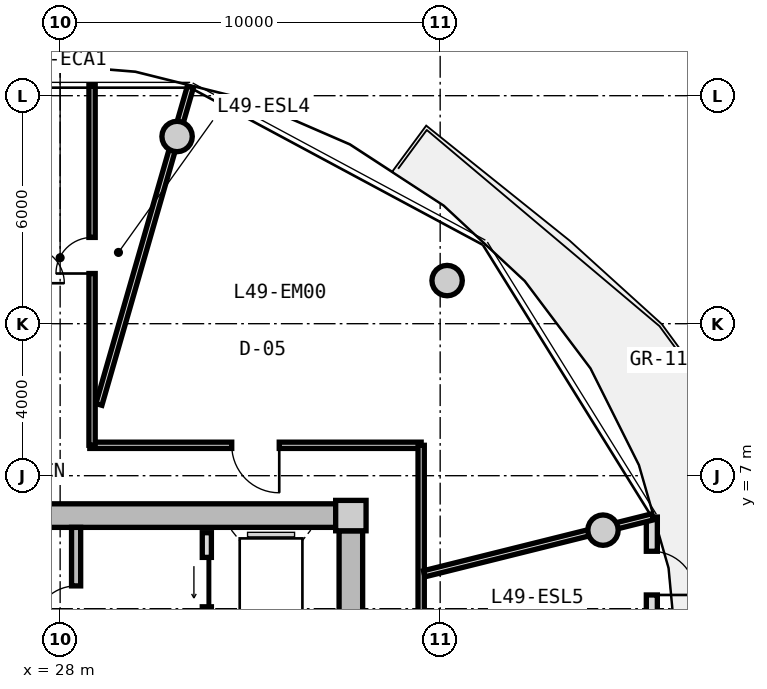
"""IFC4 building model, lengths in metres.
Left out: names, types, materials, properties, quantities, classifications, styles, units other than length and angle.
Written with IfcOpenShell. Run it as: python <this file> out.ifc"""

import sys

from ifc_helpers import new_model, si_unit, direction, frame, frame_2d, origin, origin_2d, place, context, subcontext, project, spatial, rectangle, circle, extrude, source, transform, mapped, element, fill, save


model = new_model("IFC4")
c1 = context("Model", 3, precision=1e-05, world=origin(), true_north=direction((0.0, 1.0)))
c2 = subcontext(c1, "Body", "Model", "MODEL_VIEW")
j1 = project(units=[si_unit("LENGTHUNIT", "METRE"), si_unit("PLANEANGLEUNIT", "RADIAN")], contexts=[c1])
p1 = place(None, origin())
s1 = spatial("IfcSite", under=j1, at=p1, CompositionType="ELEMENT")
p2 = place(p1, origin())
s2 = spatial("IfcBuilding", under=s1, at=p2, CompositionType="ELEMENT")
p3 = place(p2, frame((0.0, 0.0, 158.7)))
s3 = spatial("IfcBuildingStorey", under=s2, at=p3, CompositionType="ELEMENT", Elevation=158.7)
m1 = source(origin(), c2, "Body", "SweptSolid", [
    extrude(rectangle(XDim=0.8, YDim=0.8, at=origin_2d()), origin(), (0.0, 0.0, 1.0), 3.05),
])
p4 = place(p3, frame((35.65, 5.95, 0.0), z_axis=(0.0, 0.0, 1.0), x_axis=(1.0, 0.0, 0.0)))
e1 = element("IfcColumn", 1, at=p4, inside=s3, PredefinedType="COLUMN", context=c2, shape_type="MappedRepresentation", body=[
    mapped(m1, transform((0.0, 0.0, 0.0), x_axis=(1.0, 0.0, 0.0), y_axis=(0.0, 1.0, 0.0), z_axis=(0.0, 0.0, 1.0), scale=1.0)),
])
m2 = source(origin(), c2, "Body", "SweptSolid", [
    extrude(rectangle(XDim=14.5, YDim=0.62, at=frame_2d((7.25, 0.0))), origin(), (0.0, 0.0, 1.0), 2.81),
])
p5 = place(p3, frame((20.75, 5.95, 0.0), z_axis=(0.0, 0.0, 1.0), x_axis=(1.0, 0.0, 0.0)))
e2 = element("IfcWall", 2, at=p5, inside=s3, PredefinedType="SHEAR", context=c2, shape_type="MappedRepresentation", body=[
    mapped(m2, transform((0.0, 0.0, 0.0), x_axis=(1.0, 0.0, 0.0), y_axis=(0.0, 1.0, 0.0), z_axis=(0.0, 0.0, 1.0), scale=1.0)),
])
m3 = source(origin(), c2, "Body", "SweptSolid", [
    extrude(rectangle(XDim=11.1, YDim=0.62, at=frame_2d((5.55, 0.0))), origin(), (0.0, 0.0, 1.0), 2.81),
])
p6 = place(p3, frame((35.65, 5.55, 0.0), z_axis=(0.0, 0.0, 1.0), x_axis=(0.0, -1.0, 0.0)))
e3 = element("IfcWall", 3, at=p6, inside=s3, PredefinedType="SHEAR", context=c2, shape_type="MappedRepresentation", body=[
    mapped(m3, transform((0.0, 0.0, 0.0), x_axis=(1.0, 0.0, 0.0), y_axis=(0.0, 1.0, 0.0), z_axis=(0.0, 0.0, 1.0), scale=1.0)),
])
p7 = place(p6, frame((5.65, 0.0, 0.0)))
e4 = element("IfcOpeningElement", 4, at=p7, cuts=e3, PredefinedType="OPENING", context=c2, shape_type="SweptSolid", body=[
    extrude(rectangle(XDim=1.2, YDim=2.15, at=frame_2d((0.6, 1.075))), frame((0.0, 0.32, 0.0), z_axis=(0.0, -1.0, 0.0), x_axis=(1.0, 0.0, 0.0)), (0.0, 0.0, 1.0), 0.64),
])
m4 = source(origin(), c2, "Body", "SweptSolid", [
    extrude(circle(Radius=0.4, at=origin_2d()), origin(), (0.0, 0.0, 1.0), 3.05),
])
for number, where, z_axis, x_axis in (
    (5, (42.285, 5.567, 0.0), (0.0, 0.0, 1.0), (1.0, 0.0, 0.0)),
    (6, (38.183, 12.135, 0.0), (0.0, 0.0, 1.0), (1.0, 0.0, 0.0)),
    (7, (31.077, 15.926, 0.0), (0.0, 0.0, 1.0), (1.0, 0.0, 0.0)),
):
    element("IfcColumn", number, at=place(p3, frame(where, z_axis=z_axis, x_axis=x_axis)), inside=s3, PredefinedType="COLUMN", context=c2, shape_type="MappedRepresentation", body=[
        mapped(m4, transform((0.0, 0.0, 0.0), x_axis=(1.0, 0.0, 0.0), y_axis=(0.0, 1.0, 0.0), z_axis=(0.0, 0.0, 1.0), scale=1.0)),
    ])
m5 = source(origin(), c2, "Body", "SweptSolid", [
    extrude(rectangle(XDim=8.272, YDim=0.29, at=frame_2d((4.136, 0.0))), origin(), (0.0, 0.0, 1.0), 2.81),
])
p8 = place(p3, frame((43.57, 5.911, 0.0), z_axis=(0.0, 0.0, 1.0), x_axis=(0.0, -1.0, 0.0)))
e8 = element("IfcWall", 8, at=p8, inside=s3, PredefinedType="SOLIDWALL", context=c2, shape_type="MappedRepresentation", body=[
    mapped(m5, transform((0.0, 0.0, 0.0), x_axis=(1.0, 0.0, 0.0), y_axis=(0.0, 1.0, 0.0), z_axis=(0.0, 0.0, 1.0), scale=1.0)),
])
p9 = place(p8, frame((0.9, 0.0, 0.0)))
e9 = element("IfcOpeningElement", 9, at=p9, cuts=e8, PredefinedType="OPENING", context=c2, shape_type="SweptSolid", body=[
    extrude(rectangle(XDim=1.15, YDim=2.25, at=frame_2d((0.575, 1.125))), frame((0.0, 0.155, 0.0), z_axis=(0.0, -1.0, 0.0), x_axis=(1.0, 0.0, 0.0)), (0.0, 0.0, 1.0), 0.31),
])
p10 = place(p8, frame((2.65, 0.0, 0.85)))
e10 = element("IfcOpeningElement", 10, at=p10, cuts=e8, PredefinedType="OPENING", context=c2, shape_type="SweptSolid", body=[
    extrude(rectangle(XDim=1.2, YDim=1.5, at=frame_2d((0.6, 0.75))), frame((0.0, 0.155, 0.0), z_axis=(0.0, -1.0, 0.0), x_axis=(1.0, 0.0, 0.0)), (0.0, 0.0, 1.0), 0.31),
])
m6 = source(origin(), c2, "Body", "SweptSolid", [
    extrude(rectangle(XDim=3.19, YDim=0.24, at=frame_2d((1.595, 0.0))), origin(), (0.0, 0.0, 1.0), 2.81),
])
p11 = place(p3, frame((28.42, 2.45, 0.0), z_axis=(0.0, 0.0, 1.0), x_axis=(0.0, 1.0, 0.0)))
e11 = element("IfcWall", 11, at=p11, inside=s3, PredefinedType="PARTITIONING", context=c2, shape_type="MappedRepresentation", body=[
    mapped(m6, transform((0.0, 0.0, 0.0), x_axis=(1.0, 0.0, 0.0), y_axis=(0.0, 1.0, 0.0), z_axis=(0.0, 0.0, 1.0), scale=1.0)),
])
p12 = place(p11, frame((0.55, 0.0, 0.0)))
e12 = element("IfcOpeningElement", 12, at=p12, cuts=e11, PredefinedType="OPENING", context=c2, shape_type="SweptSolid", body=[
    extrude(rectangle(XDim=1.1, YDim=2.15, at=frame_2d((0.55, 1.075))), frame((0.0, 0.13, 0.0), z_axis=(0.0, -1.0, 0.0), x_axis=(1.0, 0.0, 0.0)), (0.0, 0.0, 1.0), 0.26),
])
m7 = source(origin(), c2, "Body", "SweptSolid", [
    extrude(rectangle(XDim=5.0, YDim=0.24, at=frame_2d((2.5, 0.0))), origin(), (0.0, 0.0, 1.0), 2.795),
])
p13 = place(p3, frame((31.86, 0.5, 0.0), z_axis=(0.0, 0.0, 1.0), x_axis=(0.0, 1.0, 0.0)))
e13 = element("IfcWall", 13, at=p13, inside=s3, PredefinedType="PARTITIONING", context=c2, shape_type="MappedRepresentation", body=[
    mapped(m7, transform((0.0, 0.0, 0.0), x_axis=(1.0, 0.0, 0.0), y_axis=(0.0, 1.0, 0.0), z_axis=(0.0, 0.0, 1.0), scale=1.0)),
])
p14 = place(p13, frame((3.05, 0.0, 0.0)))
e14 = element("IfcOpeningElement", 14, at=p14, cuts=e13, PredefinedType="OPENING", context=c2, shape_type="SweptSolid", body=[
    extrude(rectangle(XDim=1.3, YDim=2.2, at=frame_2d((0.65, 1.1))), frame((0.0, 0.13, 0.0), z_axis=(0.0, -1.0, 0.0), x_axis=(1.0, 0.0, 0.0)), (0.0, 0.0, 1.0), 0.26),
])
p15 = place(p13, frame((0.55, 0.0, 0.0)))
e15 = element("IfcOpeningElement", 15, at=p15, cuts=e13, PredefinedType="OPENING", context=c2, shape_type="SweptSolid", body=[
    extrude(rectangle(XDim=1.3, YDim=2.2, at=frame_2d((0.65, 1.1))), frame((0.0, 0.13, 0.0), z_axis=(0.0, -1.0, 0.0), x_axis=(1.0, 0.0, 0.0)), (0.0, 0.0, 1.0), 0.26),
])
m8 = source(origin(), c2, "Body", "SweptSolid", [
    extrude(rectangle(XDim=8.719, YDim=0.165, at=frame_2d((4.36, 0.0))), origin(), (0.0, 0.0, 1.0), 2.795),
])
p16 = place(p3, frame((28.781, 7.8, 0.0), z_axis=(0.0, 0.0, 1.0), x_axis=(1.0, 0.0, 0.0)))
e16 = element("IfcWall", 16, at=p16, inside=s3, PredefinedType="PARTITIONING", context=c2, shape_type="MappedRepresentation", body=[
    mapped(m8, transform((0.0, 0.0, 0.0), x_axis=(1.0, 0.0, 0.0), y_axis=(0.0, 1.0, 0.0), z_axis=(0.0, 0.0, 1.0), scale=1.0)),
])
p17 = place(p16, frame((3.735, 0.0, 0.0)))
e17 = element("IfcOpeningElement", 17, at=p17, cuts=e16, PredefinedType="OPENING", context=c2, shape_type="SweptSolid", body=[
    extrude(rectangle(XDim=1.25, YDim=2.2, at=frame_2d((0.625, 1.1))), frame((0.0, 0.093, 0.0), z_axis=(0.0, -1.0, 0.0), x_axis=(1.0, 0.0, 0.0)), (0.0, 0.0, 1.0), 0.185),
])
m9 = source(origin(), c2, "Body", "SweptSolid", [
    extrude(rectangle(XDim=6.88, YDim=0.165, at=frame_2d((3.44, 0.0))), origin(), (0.0, 0.0, 1.0), 2.795),
])
p18 = place(p3, frame((37.5, 7.8, 0.0), z_axis=(0.0, 0.0, 1.0), x_axis=(0.0, -1.0, 0.0)))
e18 = element("IfcWall", 18, at=p18, inside=s3, PredefinedType="PARTITIONING", context=c2, shape_type="MappedRepresentation", body=[
    mapped(m9, transform((0.0, 0.0, 0.0), x_axis=(1.0, 0.0, 0.0), y_axis=(0.0, 1.0, 0.0), z_axis=(0.0, 0.0, 1.0), scale=1.0)),
])
m10 = source(origin(), c2, "Body", "SweptSolid", [
    extrude(rectangle(XDim=8.695, YDim=0.165, at=frame_2d((4.348, 0.0))), origin(), (0.0, 0.0, 1.0), 2.345),
])
p19 = place(p3, frame((29.02, 8.875, 0.0), z_axis=(0.0, 0.0, 1.0), x_axis=(0.276797231892, 0.960928349263, 0.0)))
e19 = element("IfcWall", 19, at=p19, inside=s3, PredefinedType="PARTITIONING", context=c2, shape_type="MappedRepresentation", body=[
    mapped(m10, transform((0.0, 0.0, 0.0), x_axis=(1.0, 0.0, 0.0), y_axis=(0.0, 1.0, 0.0), z_axis=(0.0, 0.0, 1.0), scale=1.0)),
])
m11 = source(origin(), c2, "Body", "SweptSolid", [
    extrude(rectangle(XDim=6.193, YDim=0.165, at=frame_2d((3.096, 0.0))), origin(), (0.0, 0.0, 1.0), 2.345),
])
p20 = place(p3, frame((37.58, 4.419, 0.0), z_axis=(0.0, 0.0, 1.0), x_axis=(0.970309243466, 0.241867674657, 0.0)))
e20 = element("IfcWall", 20, at=p20, inside=s3, PredefinedType="PARTITIONING", context=c2, shape_type="MappedRepresentation", body=[
    mapped(m11, transform((0.0, 0.0, 0.0), x_axis=(1.0, 0.0, 0.0), y_axis=(0.0, 1.0, 0.0), z_axis=(0.0, 0.0, 1.0), scale=1.0)),
])
m12 = source(origin(), c2, "Body", "SweptSolid", [
    extrude(rectangle(XDim=9.48, YDim=0.165, at=frame_2d((4.74, 0.0))), origin(), (0.0, 0.0, 1.0), 2.795),
])
p21 = place(p3, frame((28.84, 17.28, 0.0), z_axis=(0.0, 0.0, 1.0), x_axis=(0.0, -1.0, 0.0)))
e21 = element("IfcWall", 21, at=p21, inside=s3, PredefinedType="PARTITIONING", context=c2, shape_type="MappedRepresentation", body=[
    mapped(m12, transform((0.0, 0.0, 0.0), x_axis=(1.0, 0.0, 0.0), y_axis=(0.0, 1.0, 0.0), z_axis=(0.0, 0.0, 1.0), scale=1.0)),
])
p22 = place(p21, frame((4.01, 0.0, 0.0)))
e22 = element("IfcOpeningElement", 22, at=p22, cuts=e21, PredefinedType="OPENING", context=c2, shape_type="SweptSolid", body=[
    extrude(rectangle(XDim=0.95, YDim=2.1, at=frame_2d((0.475, 1.05))), frame((0.0, 0.093, 0.0), z_axis=(0.0, -1.0, 0.0), x_axis=(1.0, 0.0, 0.0)), (0.0, 0.0, 1.0), 0.185),
])
m13 = source(origin(), c2, "Body", "SweptSolid", [
    extrude(rectangle(XDim=1.15, YDim=2.25, at=frame_2d((0.575, 1.125))), frame((0.0, 0.025, 0.0), z_axis=(0.0, -1.0, 0.0), x_axis=(1.0, 0.0, 0.0)), (0.0, 0.0, 1.0), 0.05),
])
p23 = place(p9, origin())
e23 = element("IfcDoor", 23, at=p23, inside=s3, OperationType="SINGLE_SWING_RIGHT", PredefinedType="DOOR", context=c2, shape_type="MappedRepresentation", body=[
    mapped(m13, transform((0.0, 0.0, 0.0), x_axis=(1.0, 0.0, 0.0), y_axis=(0.0, 1.0, 0.0), z_axis=(0.0, 0.0, 1.0), scale=1.0)),
])
fill(e9, e23)
m14 = source(origin(), c2, "Body", "SweptSolid", [
    extrude(rectangle(XDim=1.1, YDim=2.15, at=frame_2d((0.55, 1.075))), frame((0.0, 0.025, 0.0), z_axis=(0.0, -1.0, 0.0), x_axis=(1.0, 0.0, 0.0)), (0.0, 0.0, 1.0), 0.05),
])
p24 = place(p12, origin())
e24 = element("IfcDoor", 24, at=p24, inside=s3, OperationType="SINGLE_SWING_LEFT", PredefinedType="DOOR", context=c2, shape_type="MappedRepresentation", body=[
    mapped(m14, transform((0.0, 0.0, 0.0), x_axis=(1.0, 0.0, 0.0), y_axis=(0.0, 1.0, 0.0), z_axis=(0.0, 0.0, 1.0), scale=1.0)),
])
fill(e12, e24)
m15 = source(origin(), c2, "Body", "SweptSolid", [
    extrude(rectangle(XDim=1.3, YDim=2.2, at=frame_2d((0.65, 1.1))), frame((0.0, 0.025, 0.0), z_axis=(0.0, -1.0, 0.0), x_axis=(1.0, 0.0, 0.0)), (0.0, 0.0, 1.0), 0.05),
])
p25 = place(p14, origin())
e25 = element("IfcDoor", 25, at=p25, inside=s3, OperationType="SLIDING_TO_LEFT", PredefinedType="DOOR", context=c2, shape_type="MappedRepresentation", body=[
    mapped(m15, transform((0.0, 0.0, 0.0), x_axis=(1.0, 0.0, 0.0), y_axis=(0.0, 1.0, 0.0), z_axis=(0.0, 0.0, 1.0), scale=1.0)),
])
fill(e14, e25)
m16 = source(origin(), c2, "Body", "SweptSolid", [
    extrude(rectangle(XDim=0.95, YDim=2.1, at=frame_2d((0.475, 1.05))), frame((0.0, 0.025, 0.0), z_axis=(0.0, -1.0, 0.0), x_axis=(1.0, 0.0, 0.0)), (0.0, 0.0, 1.0), 0.05),
])
p26 = place(p22, frame((0.95, 0.0, 0.0), z_axis=(0.0, 0.0, 1.0), x_axis=(-1.0, 0.0, 0.0)))
e26 = element("IfcDoor", 26, at=p26, inside=s3, OperationType="SINGLE_SWING_LEFT", PredefinedType="DOOR", context=c2, shape_type="MappedRepresentation", body=[
    mapped(m16, transform((0.0, 0.0, 0.0), x_axis=(1.0, 0.0, 0.0), y_axis=(0.0, 1.0, 0.0), z_axis=(0.0, 0.0, 1.0), scale=1.0)),
])
fill(e22, e26)
m17 = source(origin(), c2, "Body", "SweptSolid", [
    extrude(rectangle(XDim=1.25, YDim=2.2, at=frame_2d((0.625, 1.1))), frame((0.0, 0.025, 0.0), z_axis=(0.0, -1.0, 0.0), x_axis=(1.0, 0.0, 0.0)), (0.0, 0.0, 1.0), 0.05),
])
p27 = place(p17, frame((1.25, 0.0, 0.0), z_axis=(0.0, 0.0, 1.0), x_axis=(-1.0, 0.0, 0.0)))
e27 = element("IfcDoor", 27, at=p27, inside=s3, OperationType="SINGLE_SWING_LEFT", PredefinedType="DOOR", context=c2, shape_type="MappedRepresentation", body=[
    mapped(m17, transform((0.0, 0.0, 0.0), x_axis=(1.0, 0.0, 0.0), y_axis=(0.0, 1.0, 0.0), z_axis=(0.0, 0.0, 1.0), scale=1.0)),
])
fill(e17, e27)
save(model, sys.argv[1])
